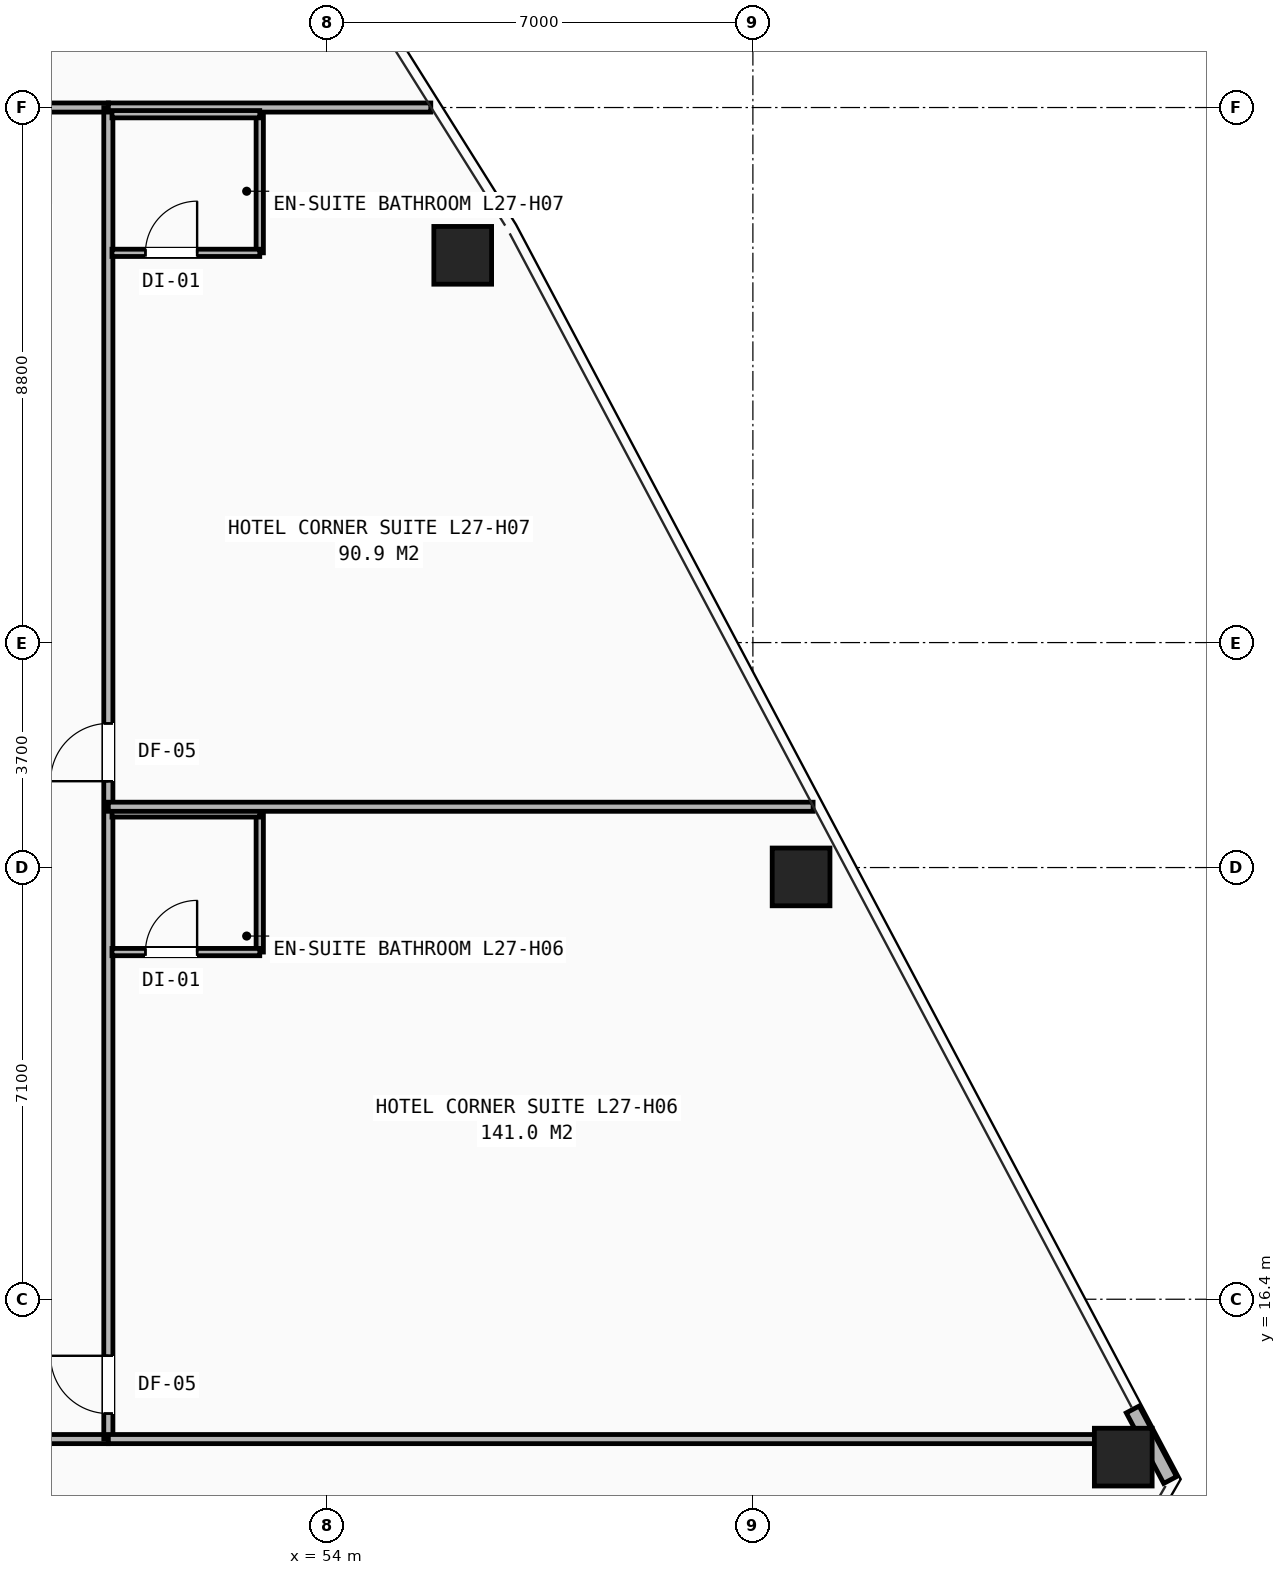
"""IFC4 building model, lengths in metres.
Left out: names, types, materials, properties, quantities, classifications, styles, units other than length and angle.
Written with IfcOpenShell. Run it as: python <this file> out.ifc"""

import sys

from ifc_helpers import new_model, si_unit, direction, frame, frame_2d, origin, origin_2d, place, context, subcontext, project, spatial, rectangle, hollow_rectangle, extrude, element, fill, save


model = new_model("IFC4")
c1 = context("Model", 3, precision=1e-05, world=origin(), true_north=direction((0.0, 1.0)))
c2 = subcontext(c1, "Body", "Model", "MODEL_VIEW")
j1 = project(units=[si_unit("LENGTHUNIT", "METRE"), si_unit("PLANEANGLEUNIT", "RADIAN")], contexts=[c1])
p1 = place(None, origin())
s1 = spatial("IfcSite", under=j1, at=p1, CompositionType="ELEMENT")
p2 = place(p1, origin())
s2 = spatial("IfcBuilding", under=s1, at=p2, CompositionType="ELEMENT")
p3 = place(p2, frame((0.0, 0.0, 95.8)))
s3 = spatial("IfcBuildingStorey", under=s2, at=p3, CompositionType="ELEMENT", Elevation=95.8)
for number, where, z_axis, x_axis in (
    (1, (67.091, 13.803, 0.0), (0.0, 0.0, 1.0), (1.0, 0.0, 0.0)),
    (2, (61.792, 23.346, 0.0), (0.0, 0.0, 1.0), (1.0, 0.0, 0.0)),
    (3, (56.228, 33.569, 0.0), (0.0, 0.0, 1.0), (1.0, 0.0, 0.0)),
):
    element("IfcColumn", number, at=place(p3, frame(where, z_axis=z_axis, x_axis=x_axis)), inside=s3, PredefinedType="COLUMN", context=c2, shape_type="SweptSolid", body=[
        extrude(hollow_rectangle(XDim=0.95, YDim=0.95, WallThickness=0.065, at=origin_2d()), origin(), (0.0, 0.0, 1.0), 3.2),
    ])
p4 = place(p3, frame((67.862, 13.427, 0.0), z_axis=(0.0, 0.0, 1.0), x_axis=(-0.468058524958, 0.883697469281, 0.0)))
e4 = element("IfcWall", 4, at=p4, inside=s3, PredefinedType="SHEAR", context=c2, shape_type="SweptSolid", body=[
    extrude(rectangle(XDim=1.313, YDim=0.24, at=frame_2d((0.657, 0.0))), origin(), (0.0, 0.0, 1.0), 2.253),
])
p5 = place(p3, frame((29.6, 14.1, 0.0), z_axis=(0.0, 0.0, 1.0), x_axis=(1.0, 0.0, 0.0)))
e5 = element("IfcWall", 5, at=p5, inside=s3, PredefinedType="PARTITIONING", context=c2, shape_type="SweptSolid", body=[
    extrude(rectangle(XDim=20.8, YDim=0.15, at=frame_2d((10.4, 0.0))), origin(), (0.0, 0.0, 1.0), 2.421),
])
p6 = place(p5, frame((0.57, 0.0, 0.0)))
e6 = element("IfcOpeningElement", 6, at=p6, cuts=e5, PredefinedType="OPENING", context=c2, shape_type="SweptSolid", body=[
    extrude(rectangle(XDim=0.95, YDim=2.1, at=frame_2d((0.475, 1.05))), frame((0.0, 0.085, 0.0), z_axis=(0.0, -1.0, 0.0), x_axis=(1.0, 0.0, 0.0)), (0.0, 0.0, 1.0), 0.17),
])
p7 = place(p5, frame((14.02, 0.0, 0.0)))
e7 = element("IfcOpeningElement", 7, at=p7, cuts=e5, PredefinedType="OPENING", context=c2, shape_type="SweptSolid", body=[
    extrude(rectangle(XDim=0.95, YDim=2.1, at=frame_2d((0.475, 1.05))), frame((0.0, 0.085, 0.0), z_axis=(0.0, -1.0, 0.0), x_axis=(1.0, 0.0, 0.0)), (0.0, 0.0, 1.0), 0.17),
])
p8 = place(p3, frame((40.75, 36.0, 0.0), z_axis=(0.0, 0.0, 1.0), x_axis=(1.0, 0.0, 0.0)))
e8 = element("IfcWall", 8, at=p8, inside=s3, PredefinedType="PARTITIONING", context=c2, shape_type="SweptSolid", body=[
    extrude(rectangle(XDim=9.65, YDim=0.15, at=frame_2d((4.825, 0.0))), origin(), (0.0, 0.0, 1.0), 2.503),
])
p9 = place(p3, frame((50.4, 14.1, 0.0), z_axis=(0.0, 0.0, 1.0), x_axis=(0.0, 1.0, 0.0)))
e9 = element("IfcWall", 9, at=p9, inside=s3, PredefinedType="PARTITIONING", context=c2, shape_type="SweptSolid", body=[
    extrude(rectangle(XDim=21.9, YDim=0.15, at=frame_2d((10.95, 0.0))), origin(), (0.0, 0.0, 1.0), 2.421),
])
p10 = place(p9, frame((0.42, 0.0, 0.0)))
e10 = element("IfcOpeningElement", 10, at=p10, cuts=e9, PredefinedType="OPENING", context=c2, shape_type="SweptSolid", body=[
    extrude(rectangle(XDim=0.95, YDim=2.1, at=frame_2d((0.475, 1.05))), frame((0.0, 0.085, 0.0), z_axis=(0.0, -1.0, 0.0), x_axis=(1.0, 0.0, 0.0)), (0.0, 0.0, 1.0), 0.17),
])
p11 = place(p9, frame((10.82, 0.0, 0.0)))
e11 = element("IfcOpeningElement", 11, at=p11, cuts=e9, PredefinedType="OPENING", context=c2, shape_type="SweptSolid", body=[
    extrude(rectangle(XDim=0.95, YDim=2.1, at=frame_2d((0.475, 1.05))), frame((0.0, 0.085, 0.0), z_axis=(0.0, -1.0, 0.0), x_axis=(1.0, 0.0, 0.0)), (0.0, 0.0, 1.0), 0.17),
])
p12 = place(p3, frame((50.4, 14.1, 0.0), z_axis=(0.0, 0.0, 1.0), x_axis=(1.0, 0.0, 0.0)))
e12 = element("IfcWall", 12, at=p12, inside=s3, PredefinedType="PARTITIONING", context=c2, shape_type="SweptSolid", body=[
    extrude(rectangle(XDim=17.1, YDim=0.15, at=frame_2d((8.55, 0.0))), origin(), (0.0, 0.0, 1.0), 2.258),
])
p13 = place(p3, frame((50.4, 36.0, 0.0), z_axis=(0.0, 0.0, 1.0), x_axis=(1.0, 0.0, 0.0)))
e13 = element("IfcWall", 13, at=p13, inside=s3, PredefinedType="PARTITIONING", context=c2, shape_type="SweptSolid", body=[
    extrude(rectangle(XDim=5.303, YDim=0.15, at=frame_2d((2.651, 0.0))), origin(), (0.0, 0.0, 1.0), 2.258),
])
p14 = place(p3, frame((52.89, 22.11, 0.0), z_axis=(0.0, 0.0, 1.0), x_axis=(0.0, 1.0, 0.0)))
e14 = element("IfcWall", 14, at=p14, inside=s3, PredefinedType="PARTITIONING", context=c2, shape_type="SweptSolid", body=[
    extrude(rectangle(XDim=2.28, YDim=0.12, at=frame_2d((1.14, 0.0))), origin(), (0.0, 0.0, 1.0), 2.97),
])
p15 = place(p3, frame((50.46, 22.11, 0.0), z_axis=(0.0, 0.0, 1.0), x_axis=(1.0, 0.0, 0.0)))
e15 = element("IfcWall", 15, at=p15, inside=s3, PredefinedType="PARTITIONING", context=c2, shape_type="SweptSolid", body=[
    extrude(rectangle(XDim=2.43, YDim=0.12, at=frame_2d((1.215, 0.0))), origin(), (0.0, 0.0, 1.0), 2.97),
])
p16 = place(p15, frame((0.55, 0.0, 0.0)))
e16 = element("IfcOpeningElement", 16, at=p16, cuts=e15, PredefinedType="OPENING", context=c2, shape_type="SweptSolid", body=[
    extrude(rectangle(XDim=0.85, YDim=2.05, at=frame_2d((0.425, 1.025))), frame((0.0, 0.07, 0.0), z_axis=(0.0, -1.0, 0.0), x_axis=(1.0, 0.0, 0.0)), (0.0, 0.0, 1.0), 0.14),
])
p17 = place(p3, frame((50.46, 24.39, 0.0), z_axis=(0.0, 0.0, 1.0), x_axis=(1.0, 0.0, 0.0)))
e17 = element("IfcWall", 17, at=p17, inside=s3, PredefinedType="PARTITIONING", context=c2, shape_type="SweptSolid", body=[
    extrude(rectangle(XDim=2.43, YDim=0.12, at=frame_2d((1.215, 0.0))), origin(), (0.0, 0.0, 1.0), 2.97),
])
p18 = place(p3, frame((50.4, 24.5, 0.0), z_axis=(0.0, 0.0, 1.0), x_axis=(1.0, 0.0, 0.0)))
e18 = element("IfcWall", 18, at=p18, inside=s3, PredefinedType="PARTITIONING", context=c2, shape_type="SweptSolid", body=[
    extrude(rectangle(XDim=11.59, YDim=0.15, at=frame_2d((5.795, 0.0))), origin(), (0.0, 0.0, 1.0), 2.258),
])
p19 = place(p3, frame((52.89, 33.61, 0.0), z_axis=(0.0, 0.0, 1.0), x_axis=(0.0, 1.0, 0.0)))
e19 = element("IfcWall", 19, at=p19, inside=s3, PredefinedType="PARTITIONING", context=c2, shape_type="SweptSolid", body=[
    extrude(rectangle(XDim=2.28, YDim=0.12, at=frame_2d((1.14, 0.0))), origin(), (0.0, 0.0, 1.0), 2.97),
])
p20 = place(p3, frame((50.46, 33.61, 0.0), z_axis=(0.0, 0.0, 1.0), x_axis=(1.0, 0.0, 0.0)))
e20 = element("IfcWall", 20, at=p20, inside=s3, PredefinedType="PARTITIONING", context=c2, shape_type="SweptSolid", body=[
    extrude(rectangle(XDim=2.43, YDim=0.12, at=frame_2d((1.215, 0.0))), origin(), (0.0, 0.0, 1.0), 2.503),
])
p21 = place(p20, frame((0.55, 0.0, 0.0)))
e21 = element("IfcOpeningElement", 21, at=p21, cuts=e20, PredefinedType="OPENING", context=c2, shape_type="SweptSolid", body=[
    extrude(rectangle(XDim=0.85, YDim=2.05, at=frame_2d((0.425, 1.025))), frame((0.0, 0.07, 0.0), z_axis=(0.0, -1.0, 0.0), x_axis=(1.0, 0.0, 0.0)), (0.0, 0.0, 1.0), 0.14),
])
p22 = place(p3, frame((50.46, 35.89, 0.0), z_axis=(0.0, 0.0, 1.0), x_axis=(1.0, 0.0, 0.0)))
e22 = element("IfcWall", 22, at=p22, inside=s3, PredefinedType="PARTITIONING", context=c2, shape_type="SweptSolid", body=[
    extrude(rectangle(XDim=2.43, YDim=0.12, at=frame_2d((1.215, 0.0))), origin(), (0.0, 0.0, 1.0), 2.97),
])
p23 = place(p10, origin())
e23 = element("IfcDoor", 23, at=p23, inside=s3, OperationType="SINGLE_SWING_RIGHT", PredefinedType="DOOR", context=c2, shape_type="SweptSolid", body=[
    extrude(rectangle(XDim=0.95, YDim=2.1, at=frame_2d((0.475, 1.05))), frame((0.0, 0.025, 0.0), z_axis=(0.0, -1.0, 0.0), x_axis=(1.0, 0.0, 0.0)), (0.0, 0.0, 1.0), 0.05),
])
fill(e10, e23)
p24 = place(p16, origin())
e24 = element("IfcDoor", 24, at=p24, inside=s3, OperationType="SINGLE_SWING_RIGHT", PredefinedType="DOOR", context=c2, shape_type="SweptSolid", body=[
    extrude(rectangle(XDim=0.85, YDim=2.05, at=frame_2d((0.425, 1.025))), frame((0.0, 0.025, 0.0), z_axis=(0.0, -1.0, 0.0), x_axis=(1.0, 0.0, 0.0)), (0.0, 0.0, 1.0), 0.05),
])
fill(e16, e24)
p25 = place(p11, origin())
e25 = element("IfcDoor", 25, at=p25, inside=s3, OperationType="SINGLE_SWING_LEFT", PredefinedType="DOOR", context=c2, shape_type="SweptSolid", body=[
    extrude(rectangle(XDim=0.95, YDim=2.1, at=frame_2d((0.475, 1.05))), frame((0.0, 0.025, 0.0), z_axis=(0.0, -1.0, 0.0), x_axis=(1.0, 0.0, 0.0)), (0.0, 0.0, 1.0), 0.05),
])
fill(e11, e25)
p26 = place(p21, origin())
e26 = element("IfcDoor", 26, at=p26, inside=s3, OperationType="SINGLE_SWING_RIGHT", PredefinedType="DOOR", context=c2, shape_type="SweptSolid", body=[
    extrude(rectangle(XDim=0.85, YDim=2.05, at=frame_2d((0.425, 1.025))), frame((0.0, 0.025, 0.0), z_axis=(0.0, -1.0, 0.0), x_axis=(1.0, 0.0, 0.0)), (0.0, 0.0, 1.0), 0.05),
])
fill(e21, e26)
save(model, sys.argv[1])
